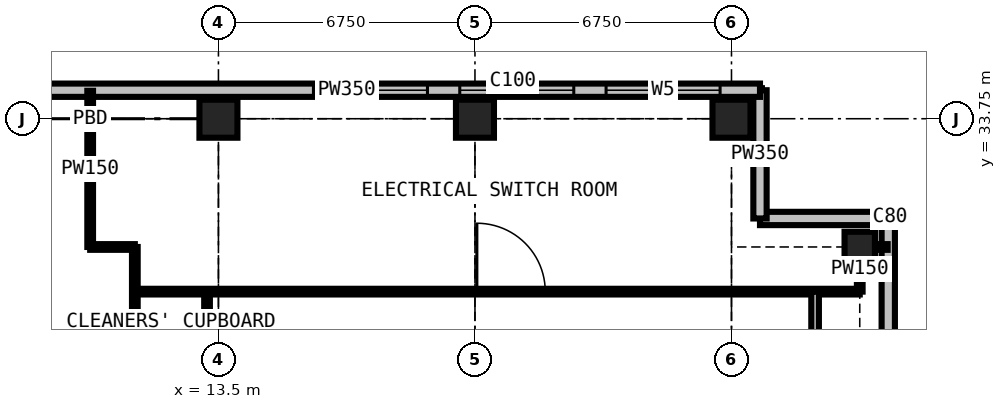
"""IFC4 building model, lengths in metres.
Left out: names, types, materials, properties, quantities, classifications, styles, units other than length and angle.
Written with IfcOpenShell. Run it as: python <this file> out.ifc"""

import sys

from ifc_helpers import new_model, si_unit, direction, frame, frame_2d, origin, origin_2d, place, context, subcontext, project, spatial, rectangle, extrude, element, fill, save


model = new_model("IFC4")
c1 = context("Model", 3, precision=1e-05, world=origin(), true_north=direction((0.0, 1.0)))
c2 = subcontext(c1, "Body", "Model", "MODEL_VIEW")
j1 = project(units=[si_unit("LENGTHUNIT", "METRE"), si_unit("PLANEANGLEUNIT", "RADIAN")], contexts=[c1])
p1 = place(None, origin())
s1 = spatial("IfcSite", under=j1, at=p1, CompositionType="ELEMENT")
p2 = place(p1, origin())
s2 = spatial("IfcBuilding", under=s1, at=p2, CompositionType="ELEMENT")
p3 = place(p2, frame((0.0, 0.0, 254.7)))
s3 = spatial("IfcBuildingStorey", under=s2, at=p3, CompositionType="ELEMENT", Elevation=254.7)
for number, where, z_axis, x_axis in (
    (1, (13.5, 33.75, 0.0), (0.0, 0.0, 1.0), (1.0, 0.0, 0.0)),
    (2, (20.25, 33.75, 0.0), (0.0, 0.0, 1.0), (1.0, 0.0, 0.0)),
    (3, (27.0, 33.75, 0.0), (0.0, 0.0, 1.0), (1.0, 0.0, 0.0)),
):
    element("IfcColumn", number, at=place(p3, frame(where, z_axis=z_axis, x_axis=x_axis)), inside=s3, PredefinedType="COLUMN", context=c2, shape_type="SweptSolid", body=[
        extrude(rectangle(XDim=1.0, YDim=1.0, at=origin_2d()), origin(), (0.0, 0.0, 1.0), 4.5),
    ])
p4 = place(p3, frame((30.375, 30.375, 0.0), z_axis=(0.0, 0.0, 1.0), x_axis=(1.0, 0.0, 0.0)))
e4 = element("IfcColumn", 4, at=p4, inside=s3, PredefinedType="COLUMN", context=c2, shape_type="SweptSolid", body=[
    extrude(rectangle(XDim=0.8, YDim=0.8, at=origin_2d()), origin(), (0.0, 0.0, 1.0), 4.5),
])
for number, where, z_axis, x_axis in (
    (5, (31.125, 27.75, 0.0), (0.0, 0.0, 1.0), (0.0, 1.0, 0.0)),
    (6, (31.125, 31.125, 0.0), (0.0, 0.0, 1.0), (-1.0, 0.0, 0.0)),
    (7, (27.75, 31.125, 0.0), (0.0, 0.0, 1.0), (0.0, 1.0, 0.0)),
):
    element("IfcWall", number, at=place(p3, frame(where, z_axis=z_axis, x_axis=x_axis)), inside=s3, PredefinedType="SOLIDWALL", context=c2, shape_type="SweptSolid", body=[
        extrude(rectangle(XDim=3.375, YDim=0.35, at=frame_2d((1.688, 0.0))), origin(), (0.0, 0.0, 1.0), 5.6),
    ])
p5 = place(p3, frame((27.75, 34.5, 0.0), z_axis=(0.0, 0.0, 1.0), x_axis=(-1.0, 0.0, 0.0)))
e8 = element("IfcWall", 8, at=p5, inside=s3, PredefinedType="SOLIDWALL", context=c2, shape_type="SweptSolid", body=[
    extrude(rectangle(XDim=21.75, YDim=0.35, at=frame_2d((10.875, 0.0))), origin(), (0.0, 0.0, 1.0), 5.6),
])
p6 = place(p5, frame((1.05, 0.0, 0.9)))
e9 = element("IfcOpeningElement", 9, at=p6, cuts=e8, PredefinedType="OPENING", context=c2, shape_type="SweptSolid", body=[
    extrude(rectangle(XDim=3.0, YDim=3.0, at=frame_2d((1.5, 1.5))), frame((0.0, 0.185, 0.0), z_axis=(0.0, -1.0, 0.0), x_axis=(1.0, 0.0, 0.0)), (0.0, 0.0, 1.0), 0.37),
])
p7 = place(p5, frame((4.9, 0.0, 0.9)))
e10 = element("IfcOpeningElement", 10, at=p7, cuts=e8, PredefinedType="OPENING", context=c2, shape_type="SweptSolid", body=[
    extrude(rectangle(XDim=3.0, YDim=3.0, at=frame_2d((1.5, 1.5))), frame((0.0, 0.185, 0.0), z_axis=(0.0, -1.0, 0.0), x_axis=(1.0, 0.0, 0.0)), (0.0, 0.0, 1.0), 0.37),
])
p8 = place(p5, frame((8.75, 0.0, 0.9)))
e11 = element("IfcOpeningElement", 11, at=p8, cuts=e8, PredefinedType="OPENING", context=c2, shape_type="SweptSolid", body=[
    extrude(rectangle(XDim=3.0, YDim=3.0, at=frame_2d((1.5, 1.5))), frame((0.0, 0.185, 0.0), z_axis=(0.0, -1.0, 0.0), x_axis=(1.0, 0.0, 0.0)), (0.0, 0.0, 1.0), 0.37),
])
p9 = place(p3, frame((10.125, 30.375, 0.0), z_axis=(0.0, 0.0, 1.0), x_axis=(0.0, 1.0, 0.0)))
e12 = element("IfcWall", 12, at=p9, inside=s3, PredefinedType="PARTITIONING", context=c2, shape_type="SweptSolid", body=[
    extrude(rectangle(XDim=4.109, YDim=0.15, at=frame_2d((2.054, 0.0))), origin(), (0.0, 0.0, 1.0), 4.15),
])
p10 = place(p3, frame((10.125, 30.375, 0.0), z_axis=(0.0, 0.0, 1.0), x_axis=(1.0, 0.0, 0.0)))
e13 = element("IfcWall", 13, at=p10, inside=s3, PredefinedType="PARTITIONING", context=c2, shape_type="SweptSolid", body=[
    extrude(rectangle(XDim=1.175, YDim=0.15, at=frame_2d((0.587, 0.0))), origin(), (0.0, 0.0, 1.0), 4.15),
])
p11 = place(p3, frame((11.3, 11.3, 0.0), z_axis=(0.0, 0.0, 1.0), x_axis=(0.0, 1.0, 0.0)))
e14 = element("IfcWall", 14, at=p11, inside=s3, PredefinedType="PARTITIONING", context=c2, shape_type="SweptSolid", body=[
    extrude(rectangle(XDim=19.075, YDim=0.15, at=frame_2d((9.538, 0.0))), origin(), (0.0, 0.0, 1.0), 4.15),
])
p12 = place(p11, frame((7.25, 0.0, 0.0)))
e15 = element("IfcOpeningElement", 15, at=p12, cuts=e14, PredefinedType="OPENING", context=c2, shape_type="SweptSolid", body=[
    extrude(rectangle(XDim=1.8, YDim=2.4, at=frame_2d((0.9, 1.2))), frame((0.0, 0.085, 0.0), z_axis=(0.0, -1.0, 0.0), x_axis=(1.0, 0.0, 0.0)), (0.0, 0.0, 1.0), 0.17),
])
p13 = place(p3, frame((11.3, 29.2, 0.0), z_axis=(0.0, 0.0, 1.0), x_axis=(1.0, 0.0, 0.0)))
e16 = element("IfcWall", 16, at=p13, inside=s3, PredefinedType="PARTITIONING", context=c2, shape_type="SweptSolid", body=[
    extrude(rectangle(XDim=19.075, YDim=0.15, at=frame_2d((9.538, 0.0))), origin(), (0.0, 0.0, 1.0), 4.15),
])
p14 = place(p13, frame((9.0, 0.0, 0.0)))
e17 = element("IfcOpeningElement", 17, at=p14, cuts=e16, PredefinedType="OPENING", context=c2, shape_type="SweptSolid", body=[
    extrude(rectangle(XDim=1.8, YDim=2.4, at=frame_2d((0.9, 1.2))), frame((0.0, 0.085, 0.0), z_axis=(0.0, -1.0, 0.0), x_axis=(1.0, 0.0, 0.0)), (0.0, 0.0, 1.0), 0.17),
])
p15 = place(p3, frame((13.2, 27.6, 0.0), z_axis=(0.0, 0.0, 1.0), x_axis=(0.0, 1.0, 0.0)))
e18 = element("IfcWall", 18, at=p15, inside=s3, PredefinedType="PARTITIONING", context=c2, shape_type="SweptSolid", body=[
    extrude(rectangle(XDim=1.6, YDim=0.15, at=frame_2d((0.8, 0.0))), origin(), (0.0, 0.0, 1.0), 4.15),
])
p16 = place(p3, frame((29.2, 11.3, 0.0), z_axis=(0.0, 0.0, 1.0), x_axis=(0.0, 1.0, 0.0)))
e19 = element("IfcWall", 19, at=p16, inside=s3, PredefinedType="PARTITIONING", context=c2, shape_type="SweptSolid", body=[
    extrude(rectangle(XDim=17.9, YDim=0.2, at=frame_2d((8.95, 0.0))), origin(), (0.0, 0.0, 1.0), 4.15),
])
p17 = place(p16, frame((8.05, 0.0, 0.0)))
e20 = element("IfcOpeningElement", 20, at=p17, cuts=e19, PredefinedType="OPENING", context=c2, shape_type="SweptSolid", body=[
    extrude(rectangle(XDim=1.8, YDim=2.4, at=frame_2d((0.9, 1.2))), frame((0.0, 0.11, 0.0), z_axis=(0.0, -1.0, 0.0), x_axis=(1.0, 0.0, 0.0)), (0.0, 0.0, 1.0), 0.22),
])
p18 = place(p3, frame((30.375, 29.2, 0.0), z_axis=(0.0, 0.0, 1.0), x_axis=(0.0, 1.0, 0.0)))
e21 = element("IfcWall", 21, at=p18, inside=s3, PredefinedType="PARTITIONING", context=c2, shape_type="SweptSolid", body=[
    extrude(rectangle(XDim=1.175, YDim=0.15, at=frame_2d((0.587, 0.0))), origin(), (0.0, 0.0, 1.0), 3.652),
])
p19 = place(p3, frame((30.375, 30.375, 0.0), z_axis=(0.0, 0.0, 1.0), x_axis=(1.0, 0.0, 0.0)))
e22 = element("IfcWall", 22, at=p19, inside=s3, PredefinedType="PARTITIONING", context=c2, shape_type="SweptSolid", body=[
    extrude(rectangle(XDim=0.734, YDim=0.15, at=frame_2d((0.367, 0.0))), origin(), (0.0, 0.0, 1.0), 4.15),
])
p20 = place(p6, origin())
e23 = element("IfcWindow", 23, at=p20, inside=s3, PartitioningType="SINGLE_PANEL", PredefinedType="WINDOW", context=c2, shape_type="SweptSolid", body=[
    extrude(rectangle(XDim=3.0, YDim=3.0, at=frame_2d((1.5, 1.5))), frame((0.0, 0.03, 0.0), z_axis=(0.0, -1.0, 0.0), x_axis=(1.0, 0.0, 0.0)), (0.0, 0.0, 1.0), 0.06),
])
fill(e9, e23)
p21 = place(p7, origin())
e24 = element("IfcWindow", 24, at=p21, inside=s3, PartitioningType="SINGLE_PANEL", PredefinedType="WINDOW", context=c2, shape_type="SweptSolid", body=[
    extrude(rectangle(XDim=3.0, YDim=3.0, at=frame_2d((1.5, 1.5))), frame((0.0, 0.03, 0.0), z_axis=(0.0, -1.0, 0.0), x_axis=(1.0, 0.0, 0.0)), (0.0, 0.0, 1.0), 0.06),
])
fill(e10, e24)
p22 = place(p8, origin())
e25 = element("IfcWindow", 25, at=p22, inside=s3, PartitioningType="SINGLE_PANEL", PredefinedType="WINDOW", context=c2, shape_type="SweptSolid", body=[
    extrude(rectangle(XDim=3.0, YDim=3.0, at=frame_2d((1.5, 1.5))), frame((0.0, 0.03, 0.0), z_axis=(0.0, -1.0, 0.0), x_axis=(1.0, 0.0, 0.0)), (0.0, 0.0, 1.0), 0.06),
])
fill(e11, e25)
p23 = place(p14, origin())
e26 = element("IfcDoor", 26, at=p23, inside=s3, OperationType="DOUBLE_DOOR_SINGLE_SWING", PredefinedType="DOOR", context=c2, shape_type="SweptSolid", body=[
    extrude(rectangle(XDim=1.8, YDim=2.4, at=frame_2d((0.9, 1.2))), frame((0.0, 0.025, 0.0), z_axis=(0.0, -1.0, 0.0), x_axis=(1.0, 0.0, 0.0)), (0.0, 0.0, 1.0), 0.05),
])
fill(e17, e26)
save(model, sys.argv[1])
